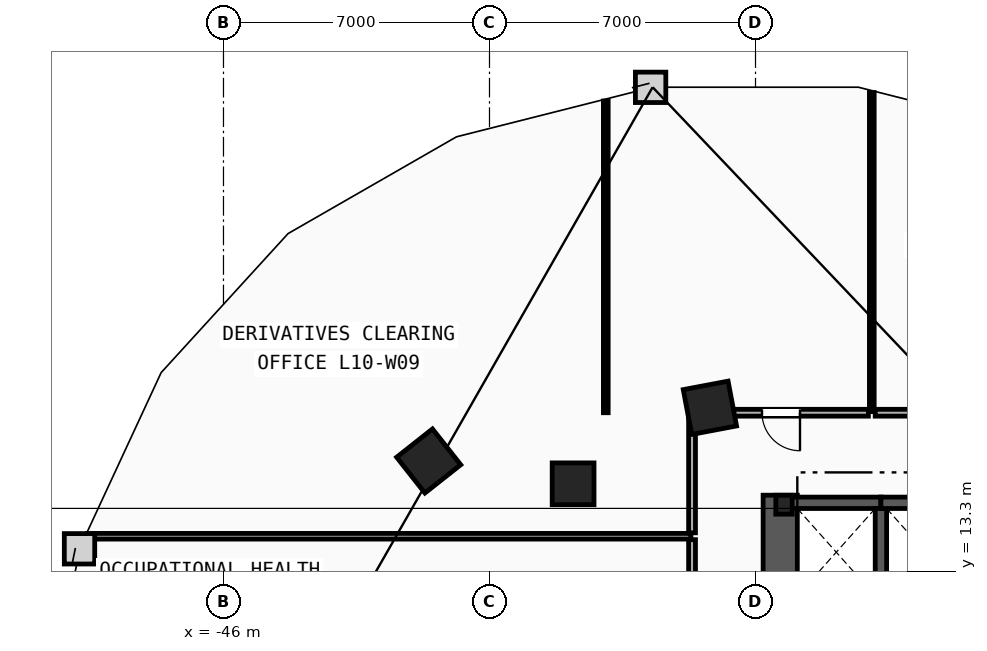
"""IFC4 building model, lengths in metres.
Left out: names, types, materials, properties, quantities, classifications, styles, units other than length and angle.
Written with IfcOpenShell. Run it as: python <this file> out.ifc"""

import sys

from ifc_helpers import new_model, si_unit, direction, frame, frame_2d, origin, origin_2d, place, context, subcontext, project, spatial, rectangle, i_section, extrude, element, fill, save


model = new_model("IFC4")
c1 = context("Model", 3, precision=1e-05, world=origin(), true_north=direction((0.0, 1.0)))
c2 = subcontext(c1, "Body", "Model", "MODEL_VIEW")
j1 = project(units=[si_unit("LENGTHUNIT", "METRE"), si_unit("PLANEANGLEUNIT", "RADIAN")], contexts=[c1])
p1 = place(None, origin())
s1 = spatial("IfcSite", under=j1, at=p1, CompositionType="ELEMENT")
p2 = place(p1, origin())
s2 = spatial("IfcBuilding", under=s1, at=p2, CompositionType="ELEMENT")
p3 = place(p2, frame((0.0, 0.0, 43.0)))
s3 = spatial("IfcBuildingStorey", under=s2, at=p3, CompositionType="ELEMENT", Elevation=43.0)
p4 = place(p3, frame((-31.25, 15.05, 0.0), z_axis=(0.0, 0.0, 1.0), x_axis=(1.0, 0.0, 0.0)))
e1 = element("IfcColumn", 1, at=p4, inside=s3, PredefinedType="COLUMN", context=c2, shape_type="SweptSolid", body=[
    extrude(i_section(OverallWidth=0.432, OverallDepth=0.498, WebThickness=0.056, FlangeThickness=0.089, FilletRadius=0.018, at=origin_2d()), origin(), (0.0, 0.0, 1.0), 3.8),
])
p5 = place(p3, frame((-36.8, 15.6, 0.0), z_axis=(0.0, 0.0, 1.0), x_axis=(1.0, 0.0, 0.0)))
e2 = element("IfcColumn", 2, at=p5, inside=s3, PredefinedType="COLUMN", context=c2, shape_type="SweptSolid", body=[
    extrude(rectangle(XDim=1.1, YDim=1.1, at=origin_2d()), origin(), (0.0, 0.0, 1.0), 3.8),
])
for number, where, z_axis, x_axis in (
    (3, (-33.2, 17.6, 0.0), (0.0, 0.0, 1.0), (-0.983, -0.186, 0.0)),
    (4, (-40.6, 16.2, 0.0), (0.0, 0.0, 1.0), (-0.785, -0.619, 0.0)),
):
    element("IfcColumn", number, at=place(p3, frame(where, z_axis=z_axis, x_axis=x_axis)), inside=s3, PredefinedType="COLUMN", context=c2, shape_type="SweptSolid", body=[
        extrude(rectangle(XDim=1.2, YDim=1.2, at=origin_2d()), origin(), (0.0, 0.0, 1.0), 3.8),
    ])
p6 = place(p3, frame((-31.35, 1.97, 0.0), z_axis=(0.0, 0.0, 1.0), x_axis=(0.0, 1.0, 0.0)))
e5 = element("IfcWall", 5, at=p6, inside=s3, PredefinedType="SHEAR", context=c2, shape_type="SweptSolid", body=[
    extrude(rectangle(XDim=13.33, YDim=0.9, at=frame_2d((6.665, 0.0))), origin(), (0.0, 0.0, 1.0), 3.5),
])
p7 = place(p3, frame((-31.2, 15.1, 0.0), z_axis=(0.0, 0.0, 1.0), x_axis=(1.0, 0.0, 0.0)))
e6 = element("IfcWall", 6, at=p7, inside=s3, PredefinedType="SHEAR", context=c2, shape_type="SweptSolid", body=[
    extrude(rectangle(XDim=2.5, YDim=0.3, at=frame_2d((1.25, 0.0))), origin(), (0.0, 0.0, 1.0), 3.5),
])
p8 = place(p3, frame((-28.7, 12.65, 0.0), z_axis=(0.0, 0.0, 1.0), x_axis=(0.0, 1.0, 0.0)))
e7 = element("IfcWall", 7, at=p8, inside=s3, PredefinedType="SHEAR", context=c2, shape_type="SweptSolid", body=[
    extrude(rectangle(XDim=2.3, YDim=0.3, at=frame_2d((1.15, 0.0))), origin(), (0.0, 0.0, 1.0), 3.5),
])
p9 = place(p3, frame((-28.7, 15.1, 0.0), z_axis=(0.0, 0.0, 1.0), x_axis=(1.0, 0.0, 0.0)))
e8 = element("IfcWall", 8, at=p9, inside=s3, PredefinedType="SHEAR", context=c2, shape_type="SweptSolid", body=[
    extrude(rectangle(XDim=2.5, YDim=0.3, at=frame_2d((1.25, 0.0))), origin(), (0.0, 0.0, 1.0), 3.5),
])
p10 = place(p3, frame((-49.585, 14.22, 0.0), z_axis=(0.0, 0.0, 1.0), x_axis=(1.0, 0.0, 0.0)))
e9 = element("IfcWall", 9, at=p10, inside=s3, PredefinedType="PARTITIONING", context=c2, shape_type="SweptSolid", body=[
    extrude(rectangle(XDim=15.885, YDim=0.15, at=frame_2d((7.942, 0.0))), origin(), (0.0, 0.0, 1.0), 3.5),
])
p11 = place(p3, frame((-35.94, 17.47, 0.0), z_axis=(0.0, 0.0, 1.0), x_axis=(0.0, 1.0, 0.0)))
e10 = element("IfcWall", 10, at=p11, inside=s3, PredefinedType="PARTITIONING", context=c2, shape_type="SweptSolid", body=[
    extrude(rectangle(XDim=8.202, YDim=0.125, at=frame_2d((4.101, 0.0))), origin(), (0.0, 0.0, 1.0), 3.5),
])
p12 = place(p3, frame((-28.94, 17.5, 0.0), z_axis=(0.0, 0.0, 1.0), x_axis=(0.0, 1.0, 0.0)))
e11 = element("IfcWall", 11, at=p12, inside=s3, PredefinedType="PARTITIONING", context=c2, shape_type="SweptSolid", body=[
    extrude(rectangle(XDim=8.395, YDim=0.125, at=frame_2d((4.197, 0.0))), origin(), (0.0, 0.0, 1.0), 3.5),
])
p13 = place(p3, frame((-33.67, 14.13, 0.0), z_axis=(0.0, 0.0, 1.0), x_axis=(0.0, -1.0, 0.0)))
e12 = element("IfcWall", 12, at=p13, inside=s3, PredefinedType="PARTITIONING", context=c2, shape_type="SweptSolid", body=[
    extrude(rectangle(XDim=5.128, YDim=0.18, at=frame_2d((2.564, 0.0))), origin(), (0.0, 0.0, 1.0), 3.5),
])
p14 = place(p13, frame((2.064, 0.0, 0.0)))
e13 = element("IfcOpeningElement", 13, at=p14, cuts=e12, PredefinedType="OPENING", context=c2, shape_type="SweptSolid", body=[
    extrude(rectangle(XDim=1.0, YDim=2.15, at=frame_2d((0.5, 1.075))), frame((0.0, 0.1, 0.0), z_axis=(0.0, -1.0, 0.0), x_axis=(1.0, 0.0, 0.0)), (0.0, 0.0, 1.0), 0.2),
])
p15 = place(p3, frame((-29.03, 17.47, 0.0), z_axis=(0.0, 0.0, 1.0), x_axis=(-1.0, 0.0, 0.0)))
e14 = element("IfcWall", 14, at=p15, inside=s3, PredefinedType="PARTITIONING", context=c2, shape_type="SweptSolid", body=[
    extrude(rectangle(XDim=4.598, YDim=0.18, at=frame_2d((2.299, 0.0))), origin(), (0.0, 0.0, 1.0), 3.5),
])
p16 = place(p15, frame((1.799, 0.0, 0.0)))
e15 = element("IfcOpeningElement", 15, at=p16, cuts=e14, PredefinedType="OPENING", context=c2, shape_type="SweptSolid", body=[
    extrude(rectangle(XDim=1.0, YDim=2.15, at=frame_2d((0.5, 1.075))), frame((0.0, 0.1, 0.0), z_axis=(0.0, -1.0, 0.0), x_axis=(1.0, 0.0, 0.0)), (0.0, 0.0, 1.0), 0.2),
])
p17 = place(p3, frame((-33.67, 17.428, 0.0), z_axis=(0.0, 0.0, 1.0), x_axis=(0.0, -1.0, 0.0)))
e16 = element("IfcWall", 16, at=p17, inside=s3, PredefinedType="PARTITIONING", context=c2, shape_type="SweptSolid", body=[
    extrude(rectangle(XDim=3.118, YDim=0.18, at=frame_2d((1.559, 0.0))), origin(), (0.0, 0.0, 1.0), 3.5),
])
p18 = place(p3, frame((-23.03, 17.47, 0.0), z_axis=(0.0, 0.0, 1.0), x_axis=(-1.0, 0.0, 0.0)))
e17 = element("IfcWall", 17, at=p18, inside=s3, PredefinedType="PARTITIONING", context=c2, shape_type="SweptSolid", body=[
    extrude(rectangle(XDim=5.82, YDim=0.18, at=frame_2d((2.91, 0.0))), origin(), (0.0, 0.0, 1.0), 3.5),
])
p19 = place(p18, frame((1.036, 0.0, 0.0)))
e18 = element("IfcOpeningElement", 18, at=p19, cuts=e17, PredefinedType="OPENING", context=c2, shape_type="SweptSolid", body=[
    extrude(rectangle(XDim=1.0, YDim=2.15, at=frame_2d((0.5, 1.075))), frame((0.0, 0.1, 0.0), z_axis=(0.0, -1.0, 0.0), x_axis=(1.0, 0.0, 0.0)), (0.0, 0.0, 1.0), 0.2),
])
p20 = place(p16, origin())
e19 = element("IfcDoor", 19, at=p20, inside=s3, OperationType="SINGLE_SWING_LEFT", PredefinedType="DOOR", context=c2, shape_type="SweptSolid", body=[
    extrude(rectangle(XDim=1.0, YDim=2.15, at=frame_2d((0.5, 1.075))), frame((0.0, 0.025, 0.0), z_axis=(0.0, -1.0, 0.0), x_axis=(1.0, 0.0, 0.0)), (0.0, 0.0, 1.0), 0.05),
])
fill(e15, e19)
save(model, sys.argv[1])
